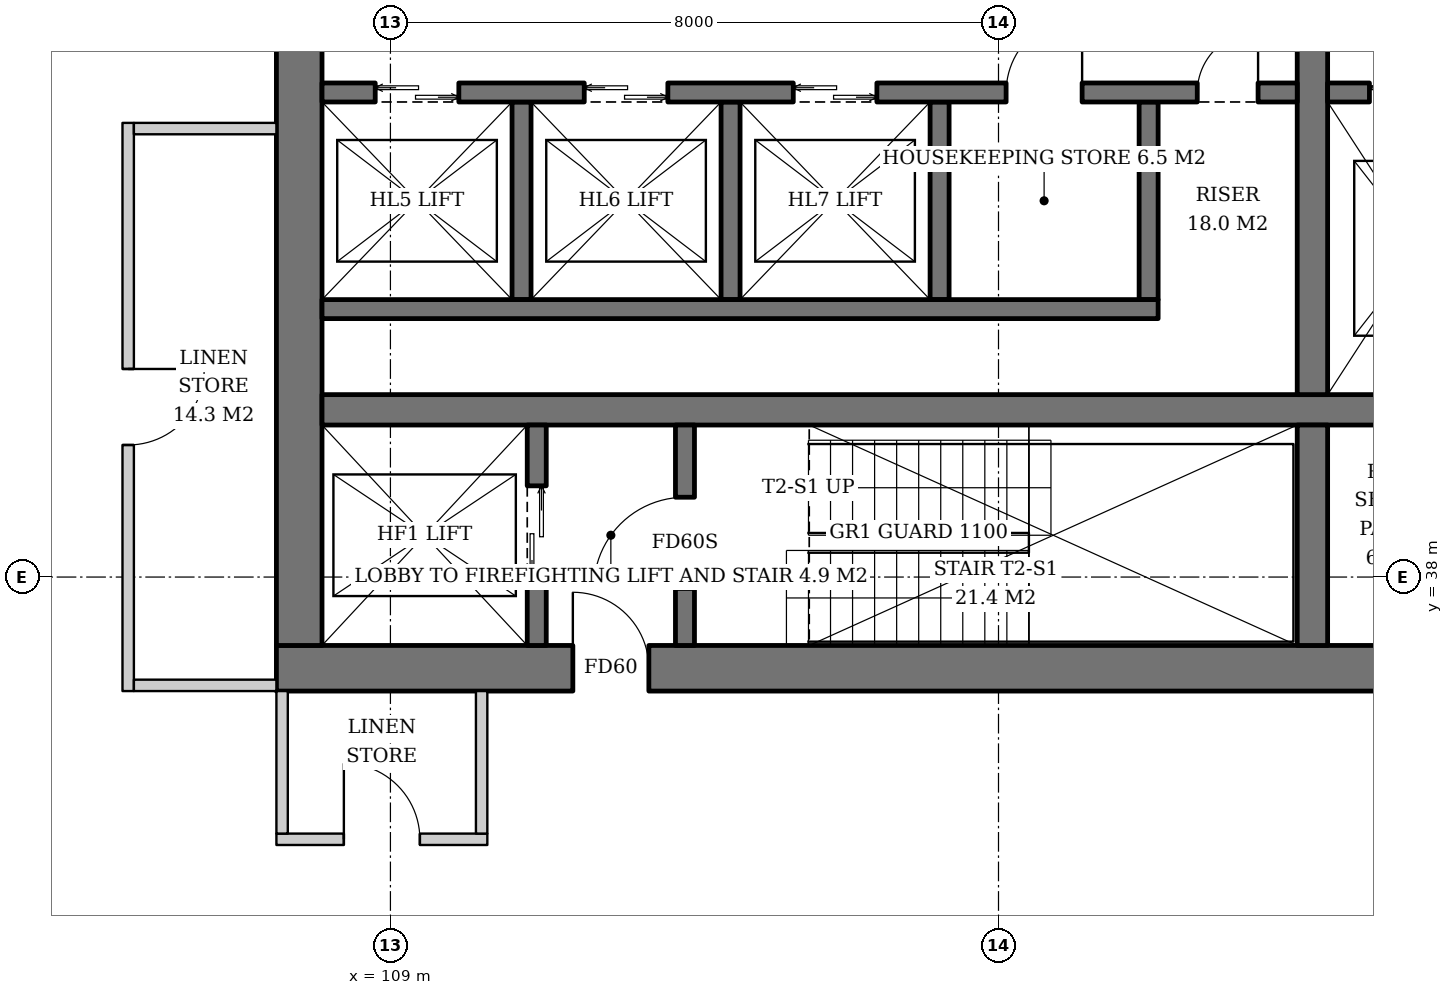
"""IFC4 building model, lengths in metres.
Left out: names, types, materials, properties, quantities, classifications, styles, units other than length and angle.
Written with IfcOpenShell. Run it as: python <this file> out.ifc"""

import sys

from ifc_helpers import new_model, si_unit, direction, frame, frame_2d, origin, place, context, subcontext, project, spatial, rectangle, extrude, element, fill, save


model = new_model("IFC4")
c1 = context("Model", 3, precision=1e-05, world=origin(), true_north=direction((0.0, 1.0)))
c2 = subcontext(c1, "Body", "Model", "MODEL_VIEW")
j1 = project(units=[si_unit("LENGTHUNIT", "METRE"), si_unit("PLANEANGLEUNIT", "RADIAN")], contexts=[c1])
p1 = place(None, origin())
s1 = spatial("IfcSite", under=j1, at=p1, CompositionType="ELEMENT")
p2 = place(p1, origin())
s2 = spatial("IfcBuilding", under=s1, at=p2, CompositionType="ELEMENT")
p3 = place(p2, frame((0.0, 0.0, 28.6)))
s3 = spatial("IfcBuildingStorey", under=s2, at=p3, CompositionType="ELEMENT", Elevation=28.6)
p4 = place(p3, frame((107.5, 36.8, 0.0), z_axis=(0.0, 0.0, 1.0), x_axis=(1.0, 0.0, 0.0)))
e1 = element("IfcWall", 1, at=p4, inside=s3, PredefinedType="SHEAR", context=c2, shape_type="SweptSolid", body=[
    extrude(rectangle(XDim=19.0, YDim=0.6, at=frame_2d((9.5, 0.0))), origin(), (0.0, 0.0, 1.0), 3.8),
])
p5 = place(p4, frame((3.9, 0.0, 0.0)))
e2 = element("IfcOpeningElement", 2, at=p5, cuts=e1, PredefinedType="OPENING", context=c2, shape_type="SweptSolid", body=[
    extrude(rectangle(XDim=1.0, YDim=2.1, at=frame_2d((0.5, 1.05))), frame((0.0, 0.31, 0.0), z_axis=(0.0, -1.0, 0.0), x_axis=(1.0, 0.0, 0.0)), (0.0, 0.0, 1.0), 0.62),
])
p6 = place(p4, frame((14.472, 0.0, 0.0)))
e3 = element("IfcOpeningElement", 3, at=p6, cuts=e1, PredefinedType="OPENING", context=c2, shape_type="SweptSolid", body=[
    extrude(rectangle(XDim=1.0, YDim=2.1, at=frame_2d((0.5, 1.05))), frame((0.0, 0.31, 0.0), z_axis=(0.0, -1.0, 0.0), x_axis=(1.0, 0.0, 0.0)), (0.0, 0.0, 1.0), 0.62),
])
p7 = place(p4, frame((16.365, 0.0, 0.0)))
e4 = element("IfcOpeningElement", 4, at=p7, cuts=e1, PredefinedType="OPENING", context=c2, shape_type="SweptSolid", body=[
    extrude(rectangle(XDim=1.0, YDim=2.1, at=frame_2d((0.5, 1.05))), frame((0.0, 0.31, 0.0), z_axis=(0.0, -1.0, 0.0), x_axis=(1.0, 0.0, 0.0)), (0.0, 0.0, 1.0), 0.62),
])
p8 = place(p3, frame((107.8, 37.1, 0.0), z_axis=(0.0, 0.0, 1.0), x_axis=(0.0, 1.0, 0.0)))
e5 = element("IfcWall", 5, at=p8, inside=s3, PredefinedType="SHEAR", context=c2, shape_type="SweptSolid", body=[
    extrude(rectangle(XDim=17.8, YDim=0.6, at=frame_2d((8.9, 0.0))), origin(), (0.0, 0.0, 1.0), 3.8),
])
p9 = place(p8, frame((8.0, 0.0, 0.0)))
e6 = element("IfcOpeningElement", 6, at=p9, cuts=e5, PredefinedType="OPENING", context=c2, shape_type="SweptSolid", body=[
    extrude(rectangle(XDim=1.8, YDim=2.4, at=frame_2d((0.9, 1.2))), frame((0.0, 0.31, 0.0), z_axis=(0.0, -1.0, 0.0), x_axis=(1.0, 0.0, 0.0)), (0.0, 0.0, 1.0), 0.62),
])
p10 = place(p3, frame((108.1, 40.2, 0.0), z_axis=(0.0, 0.0, 1.0), x_axis=(1.0, 0.0, 0.0)))
e7 = element("IfcWall", 7, at=p10, inside=s3, PredefinedType="SHEAR", context=c2, shape_type="SweptSolid", body=[
    extrude(rectangle(XDim=17.8, YDim=0.4, at=frame_2d((8.9, 0.0))), origin(), (0.0, 0.0, 1.0), 3.8),
])
p11 = place(p3, frame((121.13, 37.1, 0.0), z_axis=(0.0, 0.0, 1.0), x_axis=(0.0, 1.0, 0.0)))
e8 = element("IfcWall", 8, at=p11, inside=s3, PredefinedType="SHEAR", context=c2, shape_type="SweptSolid", body=[
    extrude(rectangle(XDim=2.9, YDim=0.4, at=frame_2d((1.45, 0.0))), origin(), (0.0, 0.0, 1.0), 3.8),
])
p12 = place(p3, frame((121.13, 40.4, 0.0), z_axis=(0.0, 0.0, 1.0), x_axis=(0.0, 1.0, 0.0)))
e9 = element("IfcWall", 9, at=p12, inside=s3, PredefinedType="SHEAR", context=c2, shape_type="SweptSolid", body=[
    extrude(rectangle(XDim=11.2, YDim=0.4, at=frame_2d((5.6, 0.0))), origin(), (0.0, 0.0, 1.0), 3.8),
])
p13 = place(p3, frame((110.925, 37.1, 0.0), z_axis=(0.0, 0.0, 1.0), x_axis=(0.0, 1.0, 0.0)))
e10 = element("IfcWall", 10, at=p13, inside=s3, PredefinedType="SHEAR", context=c2, shape_type="SweptSolid", body=[
    extrude(rectangle(XDim=2.9, YDim=0.25, at=frame_2d((1.45, 0.0))), origin(), (0.0, 0.0, 1.0), 3.8),
])
p14 = place(p13, frame((0.8, 0.0, 0.0)))
e11 = element("IfcOpeningElement", 11, at=p14, cuts=e10, PredefinedType="OPENING", context=c2, shape_type="SweptSolid", body=[
    extrude(rectangle(XDim=1.3, YDim=2.2, at=frame_2d((0.65, 1.1))), frame((0.0, 0.135, 0.0), z_axis=(0.0, -1.0, 0.0), x_axis=(1.0, 0.0, 0.0)), (0.0, 0.0, 1.0), 0.27),
])
p15 = place(p3, frame((112.875, 37.1, 0.0), z_axis=(0.0, 0.0, 1.0), x_axis=(0.0, 1.0, 0.0)))
e12 = element("IfcWall", 12, at=p15, inside=s3, PredefinedType="SHEAR", context=c2, shape_type="SweptSolid", body=[
    extrude(rectangle(XDim=2.9, YDim=0.25, at=frame_2d((1.45, 0.0))), origin(), (0.0, 0.0, 1.0), 3.8),
])
p16 = place(p15, frame((0.75, 0.0, 0.0)))
e13 = element("IfcOpeningElement", 13, at=p16, cuts=e12, PredefinedType="OPENING", context=c2, shape_type="SweptSolid", body=[
    extrude(rectangle(XDim=1.2, YDim=2.1, at=frame_2d((0.6, 1.05))), frame((0.0, 0.135, 0.0), z_axis=(0.0, -1.0, 0.0), x_axis=(1.0, 0.0, 0.0)), (0.0, 0.0, 1.0), 0.27),
])
for number, where, z_axis, x_axis in (
    (14, (110.725, 44.25, 0.0), (0.0, 0.0, 1.0), (0.0, -1.0, 0.0)),
    (15, (113.475, 44.25, 0.0), (0.0, 0.0, 1.0), (0.0, -1.0, 0.0)),
    (16, (116.225, 44.25, 0.0), (0.0, 0.0, 1.0), (0.0, -1.0, 0.0)),
    (17, (118.975, 44.25, 0.0), (0.0, 0.0, 1.0), (0.0, -1.0, 0.0)),
):
    element("IfcWall", number, at=place(p3, frame(where, z_axis=z_axis, x_axis=x_axis)), inside=s3, PredefinedType="SHEAR", context=c2, shape_type="SweptSolid", body=[
        extrude(rectangle(XDim=2.6, YDim=0.25, at=frame_2d((1.3, 0.0))), origin(), (0.0, 0.0, 1.0), 3.8),
    ])
p17 = place(p3, frame((108.1, 41.525, 0.0), z_axis=(0.0, 0.0, 1.0), x_axis=(1.0, 0.0, 0.0)))
e18 = element("IfcWall", 18, at=p17, inside=s3, PredefinedType="SHEAR", context=c2, shape_type="SweptSolid", body=[
    extrude(rectangle(XDim=11.0, YDim=0.25, at=frame_2d((5.5, 0.0))), origin(), (0.0, 0.0, 1.0), 3.8),
])
p18 = place(p3, frame((108.1, 44.375, 0.0), z_axis=(0.0, 0.0, 1.0), x_axis=(1.0, 0.0, 0.0)))
e19 = element("IfcWall", 19, at=p18, inside=s3, PredefinedType="SHEAR", context=c2, shape_type="SweptSolid", body=[
    extrude(rectangle(XDim=12.83, YDim=0.25, at=frame_2d((6.415, 0.0))), origin(), (0.0, 0.0, 1.0), 3.8),
])
p19 = place(p18, frame((0.7, 0.0, 0.0)))
e20 = element("IfcOpeningElement", 20, at=p19, cuts=e19, PredefinedType="OPENING", context=c2, shape_type="SweptSolid", body=[
    extrude(rectangle(XDim=1.1, YDim=2.2, at=frame_2d((0.55, 1.1))), frame((0.0, 0.135, 0.0), z_axis=(0.0, -1.0, 0.0), x_axis=(1.0, 0.0, 0.0)), (0.0, 0.0, 1.0), 0.27),
])
p20 = place(p18, frame((3.45, 0.0, 0.0)))
e21 = element("IfcOpeningElement", 21, at=p20, cuts=e19, PredefinedType="OPENING", context=c2, shape_type="SweptSolid", body=[
    extrude(rectangle(XDim=1.1, YDim=2.2, at=frame_2d((0.55, 1.1))), frame((0.0, 0.135, 0.0), z_axis=(0.0, -1.0, 0.0), x_axis=(1.0, 0.0, 0.0)), (0.0, 0.0, 1.0), 0.27),
])
p21 = place(p18, frame((6.2, 0.0, 0.0)))
e22 = element("IfcOpeningElement", 22, at=p21, cuts=e19, PredefinedType="OPENING", context=c2, shape_type="SweptSolid", body=[
    extrude(rectangle(XDim=1.1, YDim=2.2, at=frame_2d((0.55, 1.1))), frame((0.0, 0.135, 0.0), z_axis=(0.0, -1.0, 0.0), x_axis=(1.0, 0.0, 0.0)), (0.0, 0.0, 1.0), 0.27),
])
p22 = place(p18, frame((9.0, 0.0, 0.0)))
e23 = element("IfcOpeningElement", 23, at=p22, cuts=e19, PredefinedType="OPENING", context=c2, shape_type="SweptSolid", body=[
    extrude(rectangle(XDim=1.0, YDim=2.1, at=frame_2d((0.5, 1.05))), frame((0.0, 0.135, 0.0), z_axis=(0.0, -1.0, 0.0), x_axis=(1.0, 0.0, 0.0)), (0.0, 0.0, 1.0), 0.27),
])
p23 = place(p18, frame((11.515, 0.0, 0.0)))
e24 = element("IfcOpeningElement", 24, at=p23, cuts=e19, PredefinedType="OPENING", context=c2, shape_type="SweptSolid", body=[
    extrude(rectangle(XDim=0.8, YDim=2.0, at=frame_2d((0.4, 1.0))), frame((0.0, 0.135, 0.0), z_axis=(0.0, -1.0, 0.0), x_axis=(1.0, 0.0, 0.0)), (0.0, 0.0, 1.0), 0.27),
])
p24 = place(p3, frame((121.33, 44.375, 0.0), z_axis=(0.0, 0.0, 1.0), x_axis=(1.0, 0.0, 0.0)))
e25 = element("IfcWall", 25, at=p24, inside=s3, PredefinedType="SHEAR", context=c2, shape_type="SweptSolid", body=[
    extrude(rectangle(XDim=4.57, YDim=0.25, at=frame_2d((2.285, 0.0))), origin(), (0.0, 0.0, 1.0), 3.8),
])
p25 = place(p24, frame((0.55, 0.0, 0.0)))
e26 = element("IfcOpeningElement", 26, at=p25, cuts=e25, PredefinedType="OPENING", context=c2, shape_type="SweptSolid", body=[
    extrude(rectangle(XDim=1.4, YDim=2.4, at=frame_2d((0.7, 1.2))), frame((0.0, 0.135, 0.0), z_axis=(0.0, -1.0, 0.0), x_axis=(1.0, 0.0, 0.0)), (0.0, 0.0, 1.0), 0.27),
])
p26 = place(p24, frame((3.26, 0.0, 0.0)))
e27 = element("IfcOpeningElement", 27, at=p26, cuts=e25, PredefinedType="OPENING", context=c2, shape_type="SweptSolid", body=[
    extrude(rectangle(XDim=0.8, YDim=2.0, at=frame_2d((0.4, 1.0))), frame((0.0, 0.135, 0.0), z_axis=(0.0, -1.0, 0.0), x_axis=(1.0, 0.0, 0.0)), (0.0, 0.0, 1.0), 0.27),
])
p27 = place(p3, frame((105.55, 43.975, 0.0), z_axis=(0.0, 0.0, 1.0), x_axis=(0.0, -1.0, 0.0)))
e28 = element("IfcWall", 28, at=p27, inside=s3, PredefinedType="PARTITIONING", context=c2, shape_type="SweptSolid", body=[
    extrude(rectangle(XDim=7.475, YDim=0.15, at=frame_2d((3.738, 0.0))), origin(), (0.0, 0.0, 1.0), 2.847),
])
p28 = place(p27, frame((3.238, 0.0, 0.0)))
e29 = element("IfcOpeningElement", 29, at=p28, cuts=e28, PredefinedType="OPENING", context=c2, shape_type="SweptSolid", body=[
    extrude(rectangle(XDim=1.0, YDim=2.1, at=frame_2d((0.5, 1.05))), frame((0.0, 0.085, 0.0), z_axis=(0.0, -1.0, 0.0), x_axis=(1.0, 0.0, 0.0)), (0.0, 0.0, 1.0), 0.17),
])
for number, where, z_axis, x_axis in (
    (30, (107.5, 43.9, 0.0), (0.0, 0.0, 1.0), (-1.0, 0.0, 0.0)),
    (31, (107.5, 36.575, 0.0), (0.0, 0.0, 1.0), (-1.0, 0.0, 0.0)),
):
    element("IfcWall", number, at=place(p3, frame(where, z_axis=z_axis, x_axis=x_axis)), inside=s3, PredefinedType="PARTITIONING", context=c2, shape_type="SweptSolid", body=[
        extrude(rectangle(XDim=1.875, YDim=0.15, at=frame_2d((0.938, 0.0))), origin(), (0.0, 0.0, 1.0), 3.6),
    ])
p29 = place(p3, frame((107.5, 34.55, 0.0), z_axis=(0.0, 0.0, 1.0), x_axis=(1.0, 0.0, 0.0)))
e32 = element("IfcWall", 32, at=p29, inside=s3, PredefinedType="PARTITIONING", context=c2, shape_type="SweptSolid", body=[
    extrude(rectangle(XDim=2.775, YDim=0.15, at=frame_2d((1.387, 0.0))), origin(), (0.0, 0.0, 1.0), 2.8),
])
p30 = place(p29, frame((0.887, 0.0, 0.0)))
e33 = element("IfcOpeningElement", 33, at=p30, cuts=e32, PredefinedType="OPENING", context=c2, shape_type="SweptSolid", body=[
    extrude(rectangle(XDim=1.0, YDim=2.1, at=frame_2d((0.5, 1.05))), frame((0.0, 0.085, 0.0), z_axis=(0.0, -1.0, 0.0), x_axis=(1.0, 0.0, 0.0)), (0.0, 0.0, 1.0), 0.17),
])
p31 = place(p3, frame((107.575, 36.5, 0.0), z_axis=(0.0, 0.0, 1.0), x_axis=(0.0, -1.0, 0.0)))
e34 = element("IfcWall", 34, at=p31, inside=s3, PredefinedType="PARTITIONING", context=c2, shape_type="SweptSolid", body=[
    extrude(rectangle(XDim=1.875, YDim=0.15, at=frame_2d((0.938, 0.0))), origin(), (0.0, 0.0, 1.0), 2.8),
])
p32 = place(p3, frame((110.2, 36.5, 0.0), z_axis=(0.0, 0.0, 1.0), x_axis=(0.0, -1.0, 0.0)))
e35 = element("IfcWall", 35, at=p32, inside=s3, PredefinedType="PARTITIONING", context=c2, shape_type="SweptSolid", body=[
    extrude(rectangle(XDim=1.875, YDim=0.15, at=frame_2d((0.938, 0.0))), origin(), (0.0, 0.0, 1.0), 3.6),
])
p33 = place(p14, origin())
e36 = element("IfcDoor", 36, at=p33, inside=s3, OperationType="DOUBLE_DOOR_SLIDING", PredefinedType="DOOR", context=c2, shape_type="SweptSolid", body=[
    extrude(rectangle(XDim=1.3, YDim=2.2, at=frame_2d((0.65, 1.1))), frame((0.0, 0.025, 0.0), z_axis=(0.0, -1.0, 0.0), x_axis=(1.0, 0.0, 0.0)), (0.0, 0.0, 1.0), 0.05),
])
fill(e11, e36)
p34 = place(p16, origin())
e37 = element("IfcDoor", 37, at=p34, inside=s3, OperationType="SINGLE_SWING_LEFT", PredefinedType="DOOR", context=c2, shape_type="SweptSolid", body=[
    extrude(rectangle(XDim=1.2, YDim=2.1, at=frame_2d((0.6, 1.05))), frame((0.0, 0.025, 0.0), z_axis=(0.0, -1.0, 0.0), x_axis=(1.0, 0.0, 0.0)), (0.0, 0.0, 1.0), 0.05),
])
fill(e13, e37)
p35 = place(p19, origin())
e38 = element("IfcDoor", 38, at=p35, inside=s3, OperationType="DOUBLE_DOOR_SLIDING", PredefinedType="DOOR", context=c2, shape_type="SweptSolid", body=[
    extrude(rectangle(XDim=1.1, YDim=2.2, at=frame_2d((0.55, 1.1))), frame((0.0, 0.025, 0.0), z_axis=(0.0, -1.0, 0.0), x_axis=(1.0, 0.0, 0.0)), (0.0, 0.0, 1.0), 0.05),
])
fill(e20, e38)
p36 = place(p20, origin())
e39 = element("IfcDoor", 39, at=p36, inside=s3, OperationType="DOUBLE_DOOR_SLIDING", PredefinedType="DOOR", context=c2, shape_type="SweptSolid", body=[
    extrude(rectangle(XDim=1.1, YDim=2.2, at=frame_2d((0.55, 1.1))), frame((0.0, 0.025, 0.0), z_axis=(0.0, -1.0, 0.0), x_axis=(1.0, 0.0, 0.0)), (0.0, 0.0, 1.0), 0.05),
])
fill(e21, e39)
p37 = place(p21, origin())
e40 = element("IfcDoor", 40, at=p37, inside=s3, OperationType="DOUBLE_DOOR_SLIDING", PredefinedType="DOOR", context=c2, shape_type="SweptSolid", body=[
    extrude(rectangle(XDim=1.1, YDim=2.2, at=frame_2d((0.55, 1.1))), frame((0.0, 0.025, 0.0), z_axis=(0.0, -1.0, 0.0), x_axis=(1.0, 0.0, 0.0)), (0.0, 0.0, 1.0), 0.05),
])
fill(e22, e40)
p38 = place(p22, origin())
e41 = element("IfcDoor", 41, at=p38, inside=s3, OperationType="SINGLE_SWING_RIGHT", PredefinedType="DOOR", context=c2, shape_type="SweptSolid", body=[
    extrude(rectangle(XDim=1.0, YDim=2.1, at=frame_2d((0.5, 1.05))), frame((0.0, 0.025, 0.0), z_axis=(0.0, -1.0, 0.0), x_axis=(1.0, 0.0, 0.0)), (0.0, 0.0, 1.0), 0.05),
])
fill(e23, e41)
p39 = place(p23, origin())
e42 = element("IfcDoor", 42, at=p39, inside=s3, OperationType="SINGLE_SWING_RIGHT", PredefinedType="DOOR", context=c2, shape_type="SweptSolid", body=[
    extrude(rectangle(XDim=0.8, YDim=2.0, at=frame_2d((0.4, 1.0))), frame((0.0, 0.025, 0.0), z_axis=(0.0, -1.0, 0.0), x_axis=(1.0, 0.0, 0.0)), (0.0, 0.0, 1.0), 0.05),
])
fill(e24, e42)
p40 = place(p25, origin())
e43 = element("IfcDoor", 43, at=p40, inside=s3, OperationType="DOUBLE_DOOR_SLIDING", PredefinedType="DOOR", context=c2, shape_type="SweptSolid", body=[
    extrude(rectangle(XDim=1.4, YDim=2.4, at=frame_2d((0.7, 1.2))), frame((0.0, 0.025, 0.0), z_axis=(0.0, -1.0, 0.0), x_axis=(1.0, 0.0, 0.0)), (0.0, 0.0, 1.0), 0.05),
])
fill(e26, e43)
p41 = place(p5, origin())
e44 = element("IfcDoor", 44, at=p41, inside=s3, OperationType="SINGLE_SWING_LEFT", PredefinedType="DOOR", context=c2, shape_type="SweptSolid", body=[
    extrude(rectangle(XDim=1.0, YDim=2.1, at=frame_2d((0.5, 1.05))), frame((0.0, 0.025, 0.0), z_axis=(0.0, -1.0, 0.0), x_axis=(1.0, 0.0, 0.0)), (0.0, 0.0, 1.0), 0.05),
])
fill(e2, e44)
p42 = place(p28, origin())
e45 = element("IfcDoor", 45, at=p42, inside=s3, OperationType="SINGLE_SWING_LEFT", PredefinedType="DOOR", context=c2, shape_type="SweptSolid", body=[
    extrude(rectangle(XDim=1.0, YDim=2.1, at=frame_2d((0.5, 1.05))), frame((0.0, 0.025, 0.0), z_axis=(0.0, -1.0, 0.0), x_axis=(1.0, 0.0, 0.0)), (0.0, 0.0, 1.0), 0.05),
])
fill(e29, e45)
p43 = place(p30, origin())
e46 = element("IfcDoor", 46, at=p43, inside=s3, OperationType="SINGLE_SWING_LEFT", PredefinedType="DOOR", context=c2, shape_type="SweptSolid", body=[
    extrude(rectangle(XDim=1.0, YDim=2.1, at=frame_2d((0.5, 1.05))), frame((0.0, 0.025, 0.0), z_axis=(0.0, -1.0, 0.0), x_axis=(1.0, 0.0, 0.0)), (0.0, 0.0, 1.0), 0.05),
])
fill(e33, e46)
save(model, sys.argv[1])
